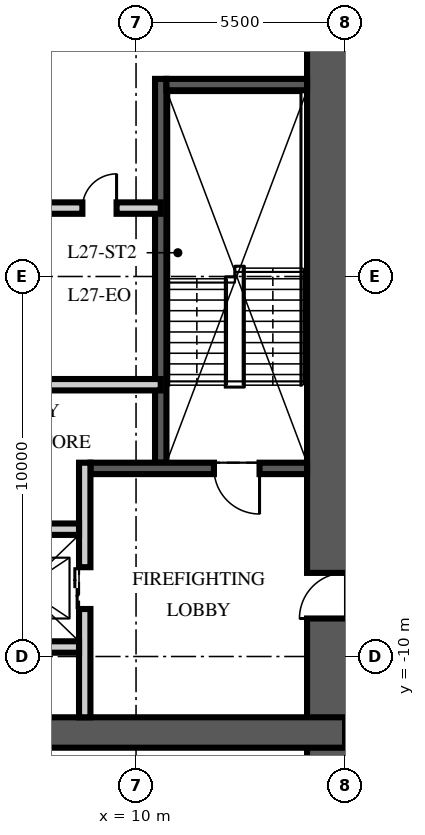
"""IFC4 building model, lengths in metres.
Left out: names, types, materials, properties, quantities, classifications, styles, units other than length and angle.
Written with IfcOpenShell. Run it as: python <this file> out.ifc"""

import sys

from ifc_helpers import new_model, si_unit, direction, frame, frame_2d, origin, place, context, subcontext, project, spatial, rectangle, extrude, element, fill, save


model = new_model("IFC4")
c1 = context("Model", 3, precision=1e-05, world=origin(), true_north=direction((0.0, 1.0)))
c2 = subcontext(c1, "Body", "Model", "MODEL_VIEW")
j1 = project(units=[si_unit("LENGTHUNIT", "METRE"), si_unit("PLANEANGLEUNIT", "RADIAN")], contexts=[c1])
p1 = place(None, origin())
s1 = spatial("IfcSite", under=j1, at=p1, CompositionType="ELEMENT")
p2 = place(p1, origin())
s2 = spatial("IfcBuilding", under=s1, at=p2, CompositionType="ELEMENT")
p3 = place(p2, frame((0.0, 0.0, 111.0)))
s3 = spatial("IfcBuildingStorey", under=s2, at=p3, CompositionType="ELEMENT", Elevation=111.0)
p4 = place(p3, frame((15.5, -15.5, -0.25), z_axis=(0.0, 0.0, 1.0), x_axis=(0.0, 1.0, 0.0)))
e1 = element("IfcWall", 1, at=p4, inside=s3, PredefinedType="SHEAR", context=c2, shape_type="SweptSolid", body=[
    extrude(rectangle(XDim=31.0, YDim=2.0, at=frame_2d((15.5, 0.0))), origin(), (0.0, 0.0, 1.0), 3.75),
])
p5 = place(p4, frame((6.5, 0.0, 0.25)))
e2 = element("IfcOpeningElement", 2, at=p5, cuts=e1, PredefinedType="OPENING", context=c2, shape_type="SweptSolid", body=[
    extrude(rectangle(XDim=1.2, YDim=2.1, at=frame_2d((0.6, 1.05))), frame((0.0, 1.01, 0.0), z_axis=(0.0, -1.0, 0.0), x_axis=(1.0, 0.0, 0.0)), (0.0, 0.0, 1.0), 2.02),
])
p6 = place(p4, frame((23.0, 0.0, 0.25)))
e3 = element("IfcOpeningElement", 3, at=p6, cuts=e1, PredefinedType="OPENING", context=c2, shape_type="SweptSolid", body=[
    extrude(rectangle(XDim=1.8, YDim=2.1, at=frame_2d((0.9, 1.05))), frame((0.0, 1.01, 0.0), z_axis=(0.0, -1.0, 0.0), x_axis=(1.0, 0.0, 0.0)), (0.0, 0.0, 1.0), 2.02),
])
p7 = place(p3, frame((-15.5, -12.0, -0.25), z_axis=(0.0, 0.0, 1.0), x_axis=(1.0, 0.0, 0.0)))
e4 = element("IfcWall", 4, at=p7, inside=s3, PredefinedType="SHEAR", context=c2, shape_type="SweptSolid", body=[
    extrude(rectangle(XDim=31.0, YDim=0.8, at=frame_2d((15.5, 0.0))), origin(), (0.0, 0.0, 1.0), 3.75),
])
p8 = place(p3, frame((10.65, -4.9, 0.0), z_axis=(0.0, 0.0, 1.0), x_axis=(0.0, 1.0, 0.0)))
e5 = element("IfcWall", 5, at=p8, inside=s3, PredefinedType="SOLIDWALL", context=c2, shape_type="SweptSolid", body=[
    extrude(rectangle(XDim=10.1, YDim=0.3, at=frame_2d((5.05, 0.0))), origin(), (0.0, 0.0, 1.0), 3.5),
])
p9 = place(p3, frame((14.5, -5.05, 0.0), z_axis=(0.0, 0.0, 1.0), x_axis=(-1.0, 0.0, 0.0)))
e6 = element("IfcWall", 6, at=p9, inside=s3, PredefinedType="SOLIDWALL", context=c2, shape_type="SweptSolid", body=[
    extrude(rectangle(XDim=5.7, YDim=0.3, at=frame_2d((2.85, 0.0))), origin(), (0.0, 0.0, 1.0), 3.5),
])
p10 = place(p9, frame((1.25, 0.0, 0.0)))
e7 = element("IfcOpeningElement", 7, at=p10, cuts=e6, PredefinedType="OPENING", context=c2, shape_type="SweptSolid", body=[
    extrude(rectangle(XDim=1.2, YDim=2.1, at=frame_2d((0.6, 1.05))), frame((0.0, 0.16, 0.0), z_axis=(0.0, -1.0, 0.0), x_axis=(1.0, 0.0, 0.0)), (0.0, 0.0, 1.0), 0.32),
])
p11 = place(p3, frame((14.5, 5.05, 0.0), z_axis=(0.0, 0.0, 1.0), x_axis=(-1.0, 0.0, 0.0)))
e8 = element("IfcWall", 8, at=p11, inside=s3, PredefinedType="SOLIDWALL", context=c2, shape_type="SweptSolid", body=[
    extrude(rectangle(XDim=3.7, YDim=0.3, at=frame_2d((1.85, 0.0))), origin(), (0.0, 0.0, 1.0), 3.5),
])
p12 = place(p3, frame((8.65, -11.6, 0.0), z_axis=(0.0, 0.0, 1.0), x_axis=(0.0, 1.0, 0.0)))
e9 = element("IfcWall", 9, at=p12, inside=s3, PredefinedType="PARTITIONING", context=c2, shape_type="SweptSolid", body=[
    extrude(rectangle(XDim=6.7, YDim=0.3, at=frame_2d((3.35, 0.0))), origin(), (0.0, 0.0, 1.0), 3.5),
])
p13 = place(p12, frame((2.85, 0.0, 0.0)))
e10 = element("IfcOpeningElement", 10, at=p13, cuts=e9, PredefinedType="OPENING", context=c2, shape_type="SweptSolid", body=[
    extrude(rectangle(XDim=1.1, YDim=2.1, at=frame_2d((0.55, 1.05))), frame((0.0, 0.16, 0.0), z_axis=(0.0, -1.0, 0.0), x_axis=(1.0, 0.0, 0.0)), (0.0, 0.0, 1.0), 0.32),
])
p14 = place(p3, frame((-8.5, -6.65, 0.0), z_axis=(0.0, 0.0, 1.0), x_axis=(1.0, 0.0, 0.0)))
e11 = element("IfcWall", 11, at=p14, inside=s3, PredefinedType="PARTITIONING", context=c2, shape_type="SweptSolid", body=[
    extrude(rectangle(XDim=17.0, YDim=0.3, at=frame_2d((8.5, 0.0))), origin(), (0.0, 0.0, 1.0), 3.5),
])
p15 = place(p14, frame((7.8, 0.0, 0.0)))
e12 = element("IfcOpeningElement", 12, at=p15, cuts=e11, PredefinedType="OPENING", context=c2, shape_type="SweptSolid", body=[
    extrude(rectangle(XDim=1.3, YDim=2.4, at=frame_2d((0.65, 1.2))), frame((0.0, 0.16, 0.0), z_axis=(0.0, -1.0, 0.0), x_axis=(1.0, 0.0, 0.0)), (0.0, 0.0, 1.0), 0.32),
])
p16 = place(p14, frame((5.65, 0.0, 0.0)))
e13 = element("IfcOpeningElement", 13, at=p16, cuts=e11, PredefinedType="OPENING", context=c2, shape_type="SweptSolid", body=[
    extrude(rectangle(XDim=0.9, YDim=2.1, at=frame_2d((0.45, 1.05))), frame((0.0, 0.16, 0.0), z_axis=(0.0, -1.0, 0.0), x_axis=(1.0, 0.0, 0.0)), (0.0, 0.0, 1.0), 0.32),
])
p17 = place(p14, frame((10.4, 0.0, 0.0)))
e14 = element("IfcOpeningElement", 14, at=p17, cuts=e11, PredefinedType="OPENING", context=c2, shape_type="SweptSolid", body=[
    extrude(rectangle(XDim=0.9, YDim=2.1, at=frame_2d((0.45, 1.05))), frame((0.0, 0.16, 0.0), z_axis=(0.0, -1.0, 0.0), x_axis=(1.0, 0.0, 0.0)), (0.0, 0.0, 1.0), 0.32),
])
p18 = place(p3, frame((5.6, -9.75, 0.0), z_axis=(0.0, 0.0, 1.0), x_axis=(1.0, 0.0, 0.0)))
e15 = element("IfcWall", 15, at=p18, inside=s3, PredefinedType="PARTITIONING", context=c2, shape_type="SweptSolid", body=[
    extrude(rectangle(XDim=2.9, YDim=0.3, at=frame_2d((1.45, 0.0))), origin(), (0.0, 0.0, 1.0), 3.5),
])
p19 = place(p3, frame((-10.65, 1.8, 0.0), z_axis=(0.0, 0.0, 1.0), x_axis=(1.0, 0.0, 0.0)))
e16 = element("IfcWall", 16, at=p19, inside=s3, PredefinedType="PARTITIONING", context=c2, shape_type="SweptSolid", body=[
    extrude(rectangle(XDim=21.3, YDim=0.3, at=frame_2d((10.65, 0.0))), origin(), (0.0, 0.0, 1.0), 3.5),
])
p20 = place(p19, frame((10.05, 0.0, 0.0)))
e17 = element("IfcOpeningElement", 17, at=p20, cuts=e16, PredefinedType="OPENING", context=c2, shape_type="SweptSolid", body=[
    extrude(rectangle(XDim=1.2, YDim=2.1, at=frame_2d((0.6, 1.05))), frame((0.0, 0.16, 0.0), z_axis=(0.0, -1.0, 0.0), x_axis=(1.0, 0.0, 0.0)), (0.0, 0.0, 1.0), 0.32),
])
p21 = place(p19, frame((19.238, 0.0, 0.0)))
e18 = element("IfcOpeningElement", 18, at=p21, cuts=e16, PredefinedType="OPENING", context=c2, shape_type="SweptSolid", body=[
    extrude(rectangle(XDim=0.9, YDim=2.1, at=frame_2d((0.45, 1.05))), frame((0.0, 0.16, 0.0), z_axis=(0.0, -1.0, 0.0), x_axis=(1.0, 0.0, 0.0)), (0.0, 0.0, 1.0), 0.32),
])
p22 = place(p3, frame((10.65, -2.848, 0.0), z_axis=(0.0, 0.0, 1.0), x_axis=(-1.0, 0.0, 0.0)))
e19 = element("IfcWall", 19, at=p22, inside=s3, PredefinedType="PARTITIONING", context=c2, shape_type="SweptSolid", body=[
    extrude(rectangle(XDim=6.45, YDim=0.3, at=frame_2d((3.225, 0.0))), origin(), (0.0, 0.0, 1.0), 3.5),
])
p23 = place(p10, origin())
e20 = element("IfcDoor", 20, at=p23, inside=s3, OperationType="SINGLE_SWING_LEFT", PredefinedType="DOOR", context=c2, shape_type="SweptSolid", body=[
    extrude(rectangle(XDim=1.2, YDim=2.1, at=frame_2d((0.6, 1.05))), frame((0.0, 0.025, 0.0), z_axis=(0.0, -1.0, 0.0), x_axis=(1.0, 0.0, 0.0)), (0.0, 0.0, 1.0), 0.05),
])
fill(e7, e20)
p24 = place(p5, origin())
e21 = element("IfcDoor", 21, at=p24, inside=s3, OperationType="SINGLE_SWING_LEFT", PredefinedType="DOOR", context=c2, shape_type="SweptSolid", body=[
    extrude(rectangle(XDim=1.2, YDim=2.1, at=frame_2d((0.6, 1.05))), frame((0.0, 0.025, 0.0), z_axis=(0.0, -1.0, 0.0), x_axis=(1.0, 0.0, 0.0)), (0.0, 0.0, 1.0), 0.05),
])
fill(e2, e21)
p25 = place(p13, origin())
e22 = element("IfcDoor", 22, at=p25, inside=s3, OperationType="DOUBLE_DOOR_SLIDING", PredefinedType="DOOR", context=c2, shape_type="SweptSolid", body=[
    extrude(rectangle(XDim=1.1, YDim=2.1, at=frame_2d((0.55, 1.05))), frame((0.0, 0.025, 0.0), z_axis=(0.0, -1.0, 0.0), x_axis=(1.0, 0.0, 0.0)), (0.0, 0.0, 1.0), 0.05),
])
fill(e10, e22)
p26 = place(p21, origin())
e23 = element("IfcDoor", 23, at=p26, inside=s3, OperationType="SINGLE_SWING_RIGHT", PredefinedType="DOOR", context=c2, shape_type="SweptSolid", body=[
    extrude(rectangle(XDim=0.9, YDim=2.1, at=frame_2d((0.45, 1.05))), frame((0.0, 0.025, 0.0), z_axis=(0.0, -1.0, 0.0), x_axis=(1.0, 0.0, 0.0)), (0.0, 0.0, 1.0), 0.05),
])
fill(e18, e23)
save(model, sys.argv[1])
